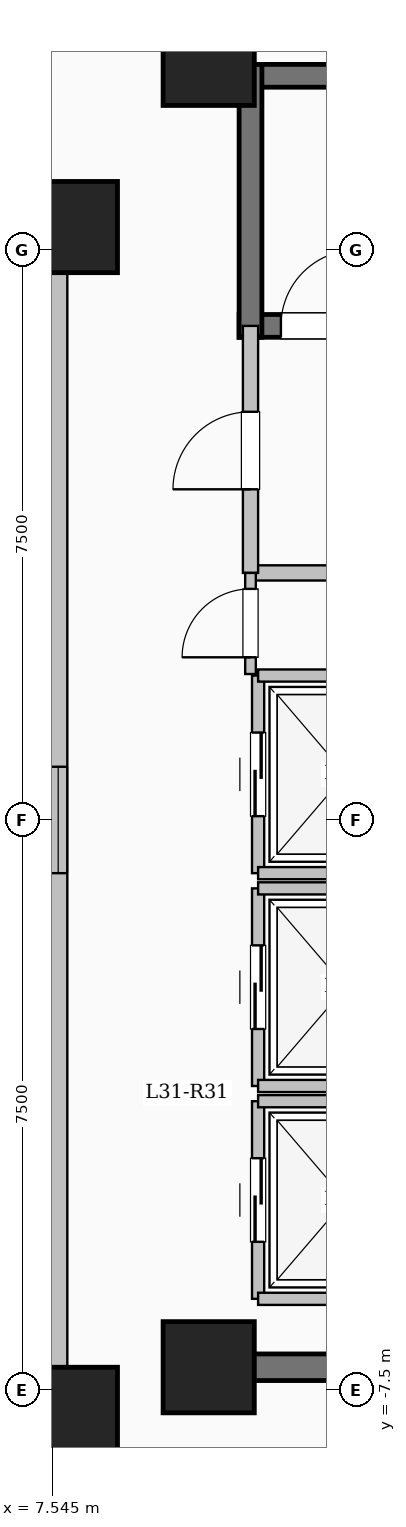
"""IFC4 building model, lengths in metres.
Left out: names, types, materials, properties, quantities, classifications, styles, units other than length and angle.
Written with IfcOpenShell. Run it as: python <this file> out.ifc"""

import sys

from ifc_helpers import new_model, si_unit, direction, frame, frame_2d, origin, origin_2d, place, context, subcontext, project, spatial, rectangle, extrude, element, fill, save


model = new_model("IFC4")
c1 = context("Model", 3, precision=1e-05, world=origin(), true_north=direction((0.0, 1.0)))
c2 = subcontext(c1, "Body", "Model", "MODEL_VIEW")
j1 = project(units=[si_unit("LENGTHUNIT", "METRE"), si_unit("PLANEANGLEUNIT", "RADIAN")], contexts=[c1])
p1 = place(None, origin())
s1 = spatial("IfcSite", under=j1, at=p1, CompositionType="ELEMENT")
p2 = place(p1, origin())
s2 = spatial("IfcBuilding", under=s1, at=p2, CompositionType="ELEMENT")
p3 = place(p2, frame((0.0, 0.0, 115.15)))
s3 = spatial("IfcBuildingStorey", under=s2, at=p3, CompositionType="ELEMENT", Elevation=115.15)
for number, where, z_axis, x_axis in (
    (1, (7.8, -7.8, 0.0), (0.0, 0.0, 1.0), (1.0, 0.0, 0.0)),
    (2, (7.8, 7.8, 0.0), (0.0, 0.0, 1.0), (1.0, 0.0, 0.0)),
    (3, (9.6, -7.2, 0.0), (0.0, 0.0, 1.0), (1.0, 0.0, 0.0)),
    (4, (9.6, 10.0, 0.0), (0.0, 0.0, 1.0), (1.0, 0.0, 0.0)),
):
    element("IfcColumn", number, at=place(p3, frame(where, z_axis=z_axis, x_axis=x_axis)), inside=s3, PredefinedType="COLUMN", context=c2, shape_type="SweptSolid", body=[
        extrude(rectangle(XDim=1.2, YDim=1.2, at=origin_2d()), origin(), (0.0, 0.0, 1.0), 3.35),
    ])
p4 = place(p3, frame((-7.62, -7.62, 0.0), z_axis=(0.0, 0.0, 1.0), x_axis=(1.0, 0.0, 0.0)))
e5 = element("IfcWall", 5, at=p4, inside=s3, PredefinedType="SOLIDWALL", context=c2, shape_type="SweptSolid", body=[
    extrude(rectangle(XDim=15.24, YDim=0.24, at=frame_2d((7.62, 0.0))), origin(), (0.0, 0.0, 1.0), 3.05),
])
p5 = place(p4, frame((6.92, 0.0, 0.95)))
e6 = element("IfcOpeningElement", 6, at=p5, cuts=e5, PredefinedType="OPENING", context=c2, shape_type="SweptSolid", body=[
    extrude(rectangle(XDim=1.4, YDim=1.5, at=frame_2d((0.7, 0.75))), frame((0.0, 0.13, 0.0), z_axis=(0.0, -1.0, 0.0), x_axis=(1.0, 0.0, 0.0)), (0.0, 0.0, 1.0), 0.26),
])
p6 = place(p3, frame((7.62, -7.62, 0.0), z_axis=(0.0, 0.0, 1.0), x_axis=(0.0, 1.0, 0.0)))
e7 = element("IfcWall", 7, at=p6, inside=s3, PredefinedType="SOLIDWALL", context=c2, shape_type="SweptSolid", body=[
    extrude(rectangle(XDim=15.24, YDim=0.24, at=frame_2d((7.62, 0.0))), origin(), (0.0, 0.0, 1.0), 3.05),
])
p7 = place(p6, frame((6.92, 0.0, 0.95)))
e8 = element("IfcOpeningElement", 8, at=p7, cuts=e7, PredefinedType="OPENING", context=c2, shape_type="SweptSolid", body=[
    extrude(rectangle(XDim=1.4, YDim=1.5, at=frame_2d((0.7, 0.75))), frame((0.0, 0.13, 0.0), z_axis=(0.0, -1.0, 0.0), x_axis=(1.0, 0.0, 0.0)), (0.0, 0.0, 1.0), 0.26),
])
p8 = place(p3, frame((7.62, 7.62, 0.0), z_axis=(0.0, 0.0, 1.0), x_axis=(-1.0, 0.0, 0.0)))
e9 = element("IfcWall", 9, at=p8, inside=s3, PredefinedType="SOLIDWALL", context=c2, shape_type="SweptSolid", body=[
    extrude(rectangle(XDim=15.24, YDim=0.24, at=frame_2d((7.62, 0.0))), origin(), (0.0, 0.0, 1.0), 3.05),
])
p9 = place(p8, frame((6.92, 0.0, 0.95)))
e10 = element("IfcOpeningElement", 10, at=p9, cuts=e9, PredefinedType="OPENING", context=c2, shape_type="SweptSolid", body=[
    extrude(rectangle(XDim=1.4, YDim=1.5, at=frame_2d((0.7, 0.75))), frame((0.0, 0.13, 0.0), z_axis=(0.0, -1.0, 0.0), x_axis=(1.0, 0.0, 0.0)), (0.0, 0.0, 1.0), 0.26),
])
p10 = place(p3, frame((10.0, 9.79, 0.0), z_axis=(0.0, 0.0, 1.0), x_axis=(1.0, 0.0, 0.0)))
e11 = element("IfcWall", 11, at=p10, inside=s3, PredefinedType="SHEAR", context=c2, shape_type="SweptSolid", body=[
    extrude(rectangle(XDim=8.0, YDim=0.3, at=frame_2d((4.0, 0.0))), origin(), (0.0, 0.0, 1.0), 3.35),
])
p11 = place(p3, frame((10.0, 6.5, 0.0), z_axis=(0.0, 0.0, 1.0), x_axis=(1.0, 0.0, 0.0)))
e12 = element("IfcWall", 12, at=p11, inside=s3, PredefinedType="SHEAR", context=c2, shape_type="SweptSolid", body=[
    extrude(rectangle(XDim=8.0, YDim=0.3, at=frame_2d((4.0, 0.0))), origin(), (0.0, 0.0, 1.0), 3.35),
])
p12 = place(p11, frame((0.55, 0.0, 0.0)))
e13 = element("IfcOpeningElement", 13, at=p12, cuts=e12, PredefinedType="OPENING", context=c2, shape_type="SweptSolid", body=[
    extrude(rectangle(XDim=1.0, YDim=2.15, at=frame_2d((0.5, 1.075))), frame((0.0, 0.16, 0.0), z_axis=(0.0, -1.0, 0.0), x_axis=(1.0, 0.0, 0.0)), (0.0, 0.0, 1.0), 0.32),
])
p13 = place(p3, frame((10.15, 6.35, 0.0), z_axis=(0.0, 0.0, 1.0), x_axis=(0.0, 1.0, 0.0)))
e14 = element("IfcWall", 14, at=p13, inside=s3, PredefinedType="SHEAR", context=c2, shape_type="SweptSolid", body=[
    extrude(rectangle(XDim=3.59, YDim=0.3, at=frame_2d((1.795, 0.0))), origin(), (0.0, 0.0, 1.0), 3.35),
])
p14 = place(p3, frame((10.15, 3.25, 0.0), z_axis=(0.0, 0.0, 1.0), x_axis=(1.0, 0.0, 0.0)))
e15 = element("IfcWall", 15, at=p14, inside=s3, PredefinedType="SOLIDWALL", context=c2, shape_type="SweptSolid", body=[
    extrude(rectangle(XDim=5.4, YDim=0.2, at=frame_2d((2.7, 0.0))), origin(), (0.0, 0.0, 1.0), 3.05),
])
p15 = place(p3, frame((10.15, 3.25, 0.0), z_axis=(0.0, 0.0, 1.0), x_axis=(0.0, 1.0, 0.0)))
e16 = element("IfcWall", 16, at=p15, inside=s3, PredefinedType="SOLIDWALL", context=c2, shape_type="SweptSolid", body=[
    extrude(rectangle(XDim=3.25, YDim=0.2, at=frame_2d((1.625, 0.0))), origin(), (0.0, 0.0, 1.0), 3.05),
])
p16 = place(p15, frame((1.1, 0.0, 0.0)))
e17 = element("IfcOpeningElement", 17, at=p16, cuts=e16, PredefinedType="OPENING", context=c2, shape_type="SweptSolid", body=[
    extrude(rectangle(XDim=1.02, YDim=2.15, at=frame_2d((0.51, 1.075))), frame((0.0, 0.11, 0.0), z_axis=(0.0, -1.0, 0.0), x_axis=(1.0, 0.0, 0.0)), (0.0, 0.0, 1.0), 0.22),
])
p17 = place(p3, frame((10.25, -6.3, 0.0), z_axis=(0.0, 0.0, 1.0), x_axis=(0.0, 1.0, 0.0)))
e18 = element("IfcWall", 18, at=p17, inside=s3, PredefinedType="SOLIDWALL", context=c2, shape_type="SweptSolid", body=[
    extrude(rectangle(XDim=2.6, YDim=0.16, at=frame_2d((1.3, 0.0))), origin(), (0.0, 0.0, 1.0), 3.05),
])
p18 = place(p17, frame((0.75, 0.0, 0.0)))
e19 = element("IfcOpeningElement", 19, at=p18, cuts=e18, PredefinedType="OPENING", context=c2, shape_type="SweptSolid", body=[
    extrude(rectangle(XDim=1.1, YDim=2.15, at=frame_2d((0.55, 1.075))), frame((0.0, 0.09, 0.0), z_axis=(0.0, -1.0, 0.0), x_axis=(1.0, 0.0, 0.0)), (0.0, 0.0, 1.0), 0.18),
])
for number, where, z_axis, x_axis in (
    (20, (10.25, -6.3, 0.0), (0.0, 0.0, 1.0), (1.0, 0.0, 0.0)),
    (21, (10.25, -3.7, 0.0), (0.0, 0.0, 1.0), (1.0, 0.0, 0.0)),
):
    element("IfcWall", number, at=place(p3, frame(where, z_axis=z_axis, x_axis=x_axis)), inside=s3, PredefinedType="SOLIDWALL", context=c2, shape_type="SweptSolid", body=[
        extrude(rectangle(XDim=2.3, YDim=0.16, at=frame_2d((1.15, 0.0))), origin(), (0.0, 0.0, 1.0), 3.05),
    ])
p19 = place(p3, frame((10.25, -3.5, 0.0), z_axis=(0.0, 0.0, 1.0), x_axis=(0.0, 1.0, 0.0)))
e22 = element("IfcWall", 22, at=p19, inside=s3, PredefinedType="SOLIDWALL", context=c2, shape_type="SweptSolid", body=[
    extrude(rectangle(XDim=2.6, YDim=0.16, at=frame_2d((1.3, 0.0))), origin(), (0.0, 0.0, 1.0), 3.05),
])
p20 = place(p19, frame((0.75, 0.0, 0.0)))
e23 = element("IfcOpeningElement", 23, at=p20, cuts=e22, PredefinedType="OPENING", context=c2, shape_type="SweptSolid", body=[
    extrude(rectangle(XDim=1.1, YDim=2.15, at=frame_2d((0.55, 1.075))), frame((0.0, 0.09, 0.0), z_axis=(0.0, -1.0, 0.0), x_axis=(1.0, 0.0, 0.0)), (0.0, 0.0, 1.0), 0.18),
])
for number, where, z_axis, x_axis in (
    (24, (10.25, -3.5, 0.0), (0.0, 0.0, 1.0), (1.0, 0.0, 0.0)),
    (25, (10.25, -0.9, 0.0), (0.0, 0.0, 1.0), (1.0, 0.0, 0.0)),
):
    element("IfcWall", number, at=place(p3, frame(where, z_axis=z_axis, x_axis=x_axis)), inside=s3, PredefinedType="SOLIDWALL", context=c2, shape_type="SweptSolid", body=[
        extrude(rectangle(XDim=2.3, YDim=0.16, at=frame_2d((1.15, 0.0))), origin(), (0.0, 0.0, 1.0), 3.05),
    ])
p21 = place(p3, frame((10.25, -0.7, 0.0), z_axis=(0.0, 0.0, 1.0), x_axis=(0.0, 1.0, 0.0)))
e26 = element("IfcWall", 26, at=p21, inside=s3, PredefinedType="SOLIDWALL", context=c2, shape_type="SweptSolid", body=[
    extrude(rectangle(XDim=2.6, YDim=0.16, at=frame_2d((1.3, 0.0))), origin(), (0.0, 0.0, 1.0), 3.05),
])
p22 = place(p21, frame((0.75, 0.0, 0.0)))
e27 = element("IfcOpeningElement", 27, at=p22, cuts=e26, PredefinedType="OPENING", context=c2, shape_type="SweptSolid", body=[
    extrude(rectangle(XDim=1.1, YDim=2.15, at=frame_2d((0.55, 1.075))), frame((0.0, 0.09, 0.0), z_axis=(0.0, -1.0, 0.0), x_axis=(1.0, 0.0, 0.0)), (0.0, 0.0, 1.0), 0.18),
])
for number, where, z_axis, x_axis in (
    (28, (10.25, -0.7, 0.0), (0.0, 0.0, 1.0), (1.0, 0.0, 0.0)),
    (29, (10.25, 1.9, 0.0), (0.0, 0.0, 1.0), (1.0, 0.0, 0.0)),
):
    element("IfcWall", number, at=place(p3, frame(where, z_axis=z_axis, x_axis=x_axis)), inside=s3, PredefinedType="SOLIDWALL", context=c2, shape_type="SweptSolid", body=[
        extrude(rectangle(XDim=2.3, YDim=0.16, at=frame_2d((1.15, 0.0))), origin(), (0.0, 0.0, 1.0), 3.05),
    ])
p23 = place(p3, frame((10.075, -7.2, 0.0), z_axis=(0.0, 0.0, 1.0), x_axis=(1.0, 0.0, 0.0)))
e30 = element("IfcWall", 30, at=p23, inside=s3, PredefinedType="SHEAR", context=c2, shape_type="SweptSolid", body=[
    extrude(rectangle(XDim=8.55, YDim=0.35, at=frame_2d((4.275, 0.0))), origin(), (0.0, 0.0, 1.0), 3.35),
])
p24 = place(p3, frame((10.15, 1.92, 0.0), z_axis=(0.0, 0.0, 1.0), x_axis=(0.0, 1.0, 0.0)))
e31 = element("IfcWall", 31, at=p24, inside=s3, PredefinedType="PARTITIONING", context=c2, shape_type="SweptSolid", body=[
    extrude(rectangle(XDim=1.33, YDim=0.14, at=frame_2d((0.665, 0.0))), origin(), (0.0, 0.0, 1.0), 3.05),
])
p25 = place(p24, frame((0.22, 0.0, 0.0)))
e32 = element("IfcOpeningElement", 32, at=p25, cuts=e31, PredefinedType="OPENING", context=c2, shape_type="SweptSolid", body=[
    extrude(rectangle(XDim=0.9, YDim=2.08, at=frame_2d((0.45, 1.04))), frame((0.0, 0.08, 0.0), z_axis=(0.0, -1.0, 0.0), x_axis=(1.0, 0.0, 0.0)), (0.0, 0.0, 1.0), 0.16),
])
p26 = place(p7, origin())
e33 = element("IfcWindow", 33, at=p26, inside=s3, PartitioningType="SINGLE_PANEL", PredefinedType="WINDOW", context=c2, shape_type="SweptSolid", body=[
    extrude(rectangle(XDim=1.4, YDim=1.5, at=frame_2d((0.7, 0.75))), frame((0.0, 0.03, 0.0), z_axis=(0.0, -1.0, 0.0), x_axis=(1.0, 0.0, 0.0)), (0.0, 0.0, 1.0), 0.06),
])
fill(e8, e33)
p27 = place(p12, origin())
e34 = element("IfcDoor", 34, at=p27, inside=s3, OperationType="SINGLE_SWING_RIGHT", PredefinedType="DOOR", context=c2, shape_type="SweptSolid", body=[
    extrude(rectangle(XDim=1.0, YDim=2.15, at=frame_2d((0.5, 1.075))), frame((0.0, 0.025, 0.0), z_axis=(0.0, -1.0, 0.0), x_axis=(1.0, 0.0, 0.0)), (0.0, 0.0, 1.0), 0.05),
])
fill(e13, e34)
p28 = place(p16, origin())
e35 = element("IfcDoor", 35, at=p28, inside=s3, OperationType="SINGLE_SWING_LEFT", PredefinedType="DOOR", context=c2, shape_type="SweptSolid", body=[
    extrude(rectangle(XDim=1.02, YDim=2.15, at=frame_2d((0.51, 1.075))), frame((0.0, 0.025, 0.0), z_axis=(0.0, -1.0, 0.0), x_axis=(1.0, 0.0, 0.0)), (0.0, 0.0, 1.0), 0.05),
])
fill(e17, e35)
p29 = place(p18, origin())
e36 = element("IfcDoor", 36, at=p29, inside=s3, OperationType="SLIDING_TO_LEFT", PredefinedType="DOOR", context=c2, shape_type="SweptSolid", body=[
    extrude(rectangle(XDim=1.1, YDim=2.15, at=frame_2d((0.55, 1.075))), frame((0.0, 0.025, 0.0), z_axis=(0.0, -1.0, 0.0), x_axis=(1.0, 0.0, 0.0)), (0.0, 0.0, 1.0), 0.05),
])
fill(e19, e36)
p30 = place(p20, origin())
e37 = element("IfcDoor", 37, at=p30, inside=s3, OperationType="SLIDING_TO_LEFT", PredefinedType="DOOR", context=c2, shape_type="SweptSolid", body=[
    extrude(rectangle(XDim=1.1, YDim=2.15, at=frame_2d((0.55, 1.075))), frame((0.0, 0.025, 0.0), z_axis=(0.0, -1.0, 0.0), x_axis=(1.0, 0.0, 0.0)), (0.0, 0.0, 1.0), 0.05),
])
fill(e23, e37)
p31 = place(p22, origin())
e38 = element("IfcDoor", 38, at=p31, inside=s3, OperationType="SLIDING_TO_LEFT", PredefinedType="DOOR", context=c2, shape_type="SweptSolid", body=[
    extrude(rectangle(XDim=1.1, YDim=2.15, at=frame_2d((0.55, 1.075))), frame((0.0, 0.025, 0.0), z_axis=(0.0, -1.0, 0.0), x_axis=(1.0, 0.0, 0.0)), (0.0, 0.0, 1.0), 0.05),
])
fill(e27, e38)
p32 = place(p25, origin())
e39 = element("IfcDoor", 39, at=p32, inside=s3, OperationType="SINGLE_SWING_LEFT", PredefinedType="DOOR", context=c2, shape_type="SweptSolid", body=[
    extrude(rectangle(XDim=0.9, YDim=2.08, at=frame_2d((0.45, 1.04))), frame((0.0, 0.025, 0.0), z_axis=(0.0, -1.0, 0.0), x_axis=(1.0, 0.0, 0.0)), (0.0, 0.0, 1.0), 0.05),
])
fill(e32, e39)
save(model, sys.argv[1])
